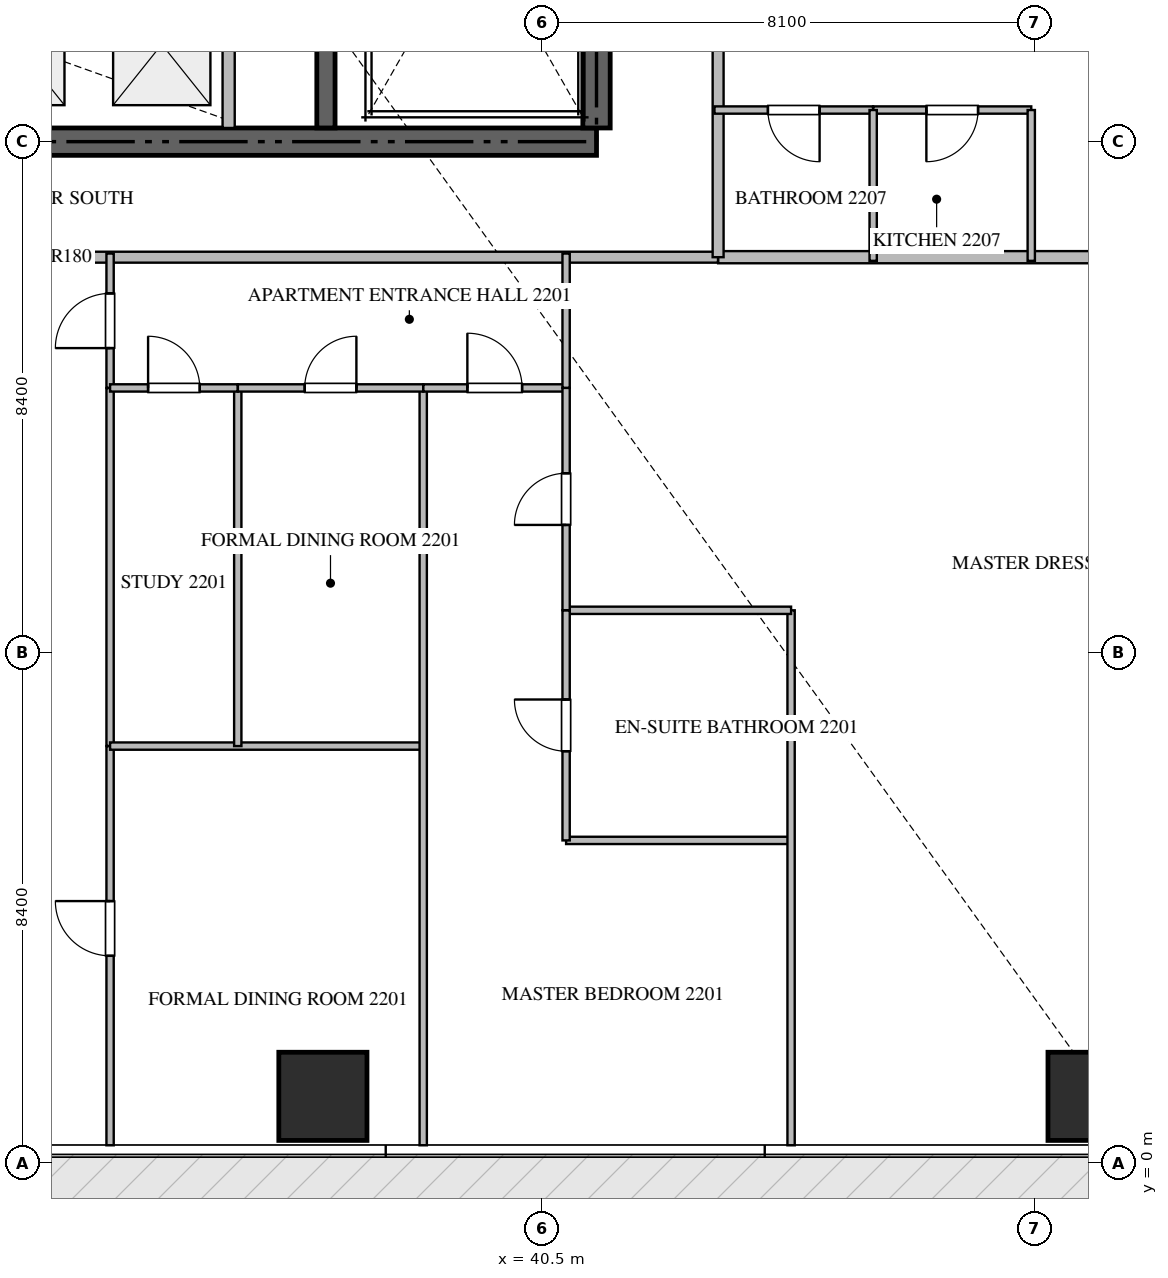
"""IFC4 building model, lengths in metres.
Left out: names, types, materials, properties, quantities, classifications, styles, units other than length and angle.
Written with IfcOpenShell. Run it as: python <this file> out.ifc"""

import sys

from ifc_helpers import new_model, si_unit, direction, frame, frame_2d, origin, origin_2d, place, context, subcontext, project, spatial, rectangle, extrude, source, transform, mapped, element, fill, save


model = new_model("IFC4")
c1 = context("Model", 3, precision=1e-05, world=origin(), true_north=direction((0.0, 1.0)))
c2 = subcontext(c1, "Body", "Model", "MODEL_VIEW")
j1 = project(units=[si_unit("LENGTHUNIT", "METRE"), si_unit("PLANEANGLEUNIT", "RADIAN")], contexts=[c1])
p1 = place(None, origin())
s1 = spatial("IfcSite", under=j1, at=p1, CompositionType="ELEMENT")
p2 = place(p1, origin())
s2 = spatial("IfcBuilding", under=s1, at=p2, CompositionType="ELEMENT")
p3 = place(p2, frame((0.0, 0.0, 90.45)))
s3 = spatial("IfcBuildingStorey", under=s2, at=p3, CompositionType="ELEMENT", Elevation=90.45)
p4 = place(p3, frame((23.4, 16.8, -0.26), z_axis=(0.0, 0.0, 1.0), x_axis=(1.0, 0.0, 0.0)))
e1 = element("IfcWall", 1, at=p4, inside=s3, PredefinedType="SHEAR", context=c2, shape_type="SweptSolid", body=[
    extrude(rectangle(XDim=18.0, YDim=0.45, at=frame_2d((9.0, 0.0))), origin(), (0.0, 0.0, 1.0), 3.748),
])
p5 = place(p3, frame((41.4, 17.025, -0.26), z_axis=(0.0, 0.0, 1.0), x_axis=(0.0, 1.0, 0.0)))
e2 = element("IfcWall", 2, at=p5, inside=s3, PredefinedType="SHEAR", context=c2, shape_type="SweptSolid", body=[
    extrude(rectangle(XDim=8.325, YDim=0.45, at=frame_2d((4.163, 0.0))), origin(), (0.0, 0.0, 1.0), 3.748),
])
p6 = place(p3, frame((36.95, 17.025, -0.26), z_axis=(0.0, 0.0, 1.0), x_axis=(0.0, 1.0, 0.0)))
e3 = element("IfcWall", 3, at=p6, inside=s3, PredefinedType="SHEAR", context=c2, shape_type="SweptSolid", body=[
    extrude(rectangle(XDim=8.325, YDim=0.3, at=frame_2d((4.163, 0.0))), origin(), (0.0, 0.0, 1.0), 3.748),
])
m1 = source(origin(), c2, "Body", "SweptSolid", [
    extrude(rectangle(XDim=1.45, YDim=1.45, at=origin_2d()), origin(), (0.0, 0.0, 1.0), 3.75),
])
for number, where, z_axis, x_axis in (
    (4, (36.9, 1.1, -0.26), (0.0, 0.0, 1.0), (1.0, 0.0, 0.0)),
    (5, (49.55, 1.1, -0.26), (0.0, 0.0, 1.0), (1.0, 0.0, 0.0)),
):
    element("IfcColumn", number, at=place(p3, frame(where, z_axis=z_axis, x_axis=x_axis)), inside=s3, PredefinedType="COLUMN", context=c2, shape_type="MappedRepresentation", body=[
        mapped(m1, transform((0.0, 0.0, 0.0), scale=1.0)),
    ])
p7 = place(p3, frame((35.35, 17.025, 0.0), z_axis=(0.0, 0.0, 1.0), x_axis=(0.0, 1.0, 0.0)))
e6 = element("IfcWall", 6, at=p7, inside=s3, PredefinedType="STANDARD", context=c2, shape_type="SweptSolid", body=[
    extrude(rectangle(XDim=2.525, YDim=0.2, at=frame_2d((1.263, 0.0))), origin(), (0.0, 0.0, 1.0), 3.49),
])
p8 = place(p3, frame((43.4, 14.9, 0.0), z_axis=(0.0, 0.0, 1.0), x_axis=(1.0, 0.0, 0.0)))
e7 = element("IfcWall", 7, at=p8, inside=s3, PredefinedType="PARTITIONING", context=c2, shape_type="SweptSolid", body=[
    extrude(rectangle(XDim=15.318, YDim=0.2, at=frame_2d((7.659, 0.0))), origin(), (0.0, 0.0, 1.0), 3.49),
])
p9 = place(p3, frame((21.402, 14.9, 0.0), z_axis=(0.0, 0.0, 1.0), x_axis=(1.0, 0.0, 0.0)))
e8 = element("IfcWall", 8, at=p9, inside=s3, PredefinedType="PARTITIONING", context=c2, shape_type="SweptSolid", body=[
    extrude(rectangle(XDim=21.996, YDim=0.18, at=frame_2d((10.998, 0.0))), origin(), (0.0, 0.0, 1.0), 3.49),
])
p10 = place(p9, frame((7.202, 0.0, 0.0)))
e9 = element("IfcOpeningElement", 9, at=p10, cuts=e8, PredefinedType="OPENING", context=c2, shape_type="SweptSolid", body=[
    extrude(rectangle(XDim=1.0, YDim=2.15, at=frame_2d((0.5, 1.075))), frame((0.0, 0.1, 0.0), z_axis=(0.0, -1.0, 0.0), x_axis=(1.0, 0.0, 0.0)), (0.0, 0.0, 1.0), 0.2),
])
p11 = place(p3, frame((43.4, 14.9, 0.0), z_axis=(0.0, 0.0, 1.0), x_axis=(0.0, 1.0, 0.0)))
e10 = element("IfcWall", 10, at=p11, inside=s3, PredefinedType="PARTITIONING", context=c2, shape_type="SweptSolid", body=[
    extrude(rectangle(XDim=20.6, YDim=0.18, at=frame_2d((10.3, 0.0))), origin(), (0.0, 0.0, 1.0), 3.49),
])
p12 = place(p11, frame((3.469, 0.0, 0.0)))
e11 = element("IfcOpeningElement", 11, at=p12, cuts=e10, PredefinedType="OPENING", context=c2, shape_type="SweptSolid", body=[
    extrude(rectangle(XDim=1.0, YDim=2.15, at=frame_2d((0.5, 1.075))), frame((0.0, 0.1, 0.0), z_axis=(0.0, -1.0, 0.0), x_axis=(1.0, 0.0, 0.0)), (0.0, 0.0, 1.0), 0.2),
])
p13 = place(p11, frame((11.074, 0.0, 0.0)))
e12 = element("IfcOpeningElement", 12, at=p13, cuts=e10, PredefinedType="OPENING", context=c2, shape_type="SweptSolid", body=[
    extrude(rectangle(XDim=1.0, YDim=2.15, at=frame_2d((0.5, 1.075))), frame((0.0, 0.1, 0.0), z_axis=(0.0, -1.0, 0.0), x_axis=(1.0, 0.0, 0.0)), (0.0, 0.0, 1.0), 0.2),
])
p14 = place(p11, frame((17.78, 0.0, 0.0)))
e13 = element("IfcOpeningElement", 13, at=p14, cuts=e10, PredefinedType="OPENING", context=c2, shape_type="SweptSolid", body=[
    extrude(rectangle(XDim=1.0, YDim=2.15, at=frame_2d((0.5, 1.075))), frame((0.0, 0.1, 0.0), z_axis=(0.0, -1.0, 0.0), x_axis=(1.0, 0.0, 0.0)), (0.0, 0.0, 1.0), 0.2),
])
p15 = place(p3, frame((33.4, 12.75, 0.0), z_axis=(0.0, 0.0, 1.0), x_axis=(0.0, 1.0, 0.0)))
e14 = element("IfcWall", 14, at=p15, inside=s3, PredefinedType="PARTITIONING", context=c2, shape_type="SweptSolid", body=[
    extrude(rectangle(XDim=2.21, YDim=0.12, at=frame_2d((1.105, 0.0))), origin(), (0.0, 0.0, 1.0), 3.49),
])
p16 = place(p15, frame((0.655, 0.0, 0.0)))
e15 = element("IfcOpeningElement", 15, at=p16, cuts=e14, PredefinedType="OPENING", context=c2, shape_type="SweptSolid", body=[
    extrude(rectangle(XDim=0.9, YDim=2.1, at=frame_2d((0.45, 1.05))), frame((0.0, 0.07, 0.0), z_axis=(0.0, -1.0, 0.0), x_axis=(1.0, 0.0, 0.0)), (0.0, 0.0, 1.0), 0.14),
])
p17 = place(p3, frame((33.4, 0.295, 0.0), z_axis=(0.0, 0.0, 1.0), x_axis=(0.0, 1.0, 0.0)))
e16 = element("IfcWall", 16, at=p17, inside=s3, PredefinedType="PARTITIONING", context=c2, shape_type="SweptSolid", body=[
    extrude(rectangle(XDim=6.565, YDim=0.12, at=frame_2d((3.283, 0.0))), origin(), (0.0, 0.0, 1.0), 3.49),
])
p18 = place(p17, frame((3.116, 0.0, 0.0)))
e17 = element("IfcOpeningElement", 17, at=p18, cuts=e16, PredefinedType="OPENING", context=c2, shape_type="SweptSolid", body=[
    extrude(rectangle(XDim=0.9, YDim=2.1, at=frame_2d((0.45, 1.05))), frame((0.0, 0.07, 0.0), z_axis=(0.0, -1.0, 0.0), x_axis=(1.0, 0.0, 0.0)), (0.0, 0.0, 1.0), 0.14),
])
p19 = place(p3, frame((33.4, 6.862, 0.0), z_axis=(0.0, 0.0, 1.0), x_axis=(0.0, 1.0, 0.0)))
e18 = element("IfcWall", 18, at=p19, inside=s3, PredefinedType="PARTITIONING", context=c2, shape_type="SweptSolid", body=[
    extrude(rectangle(XDim=5.886, YDim=0.12, at=frame_2d((2.943, 0.0))), origin(), (0.0, 0.0, 1.0), 3.49),
])
p20 = place(p3, frame((33.4, 6.86, 0.0), z_axis=(0.0, 0.0, 1.0), x_axis=(1.0, 0.0, 0.0)))
e19 = element("IfcWall", 19, at=p20, inside=s3, PredefinedType="PARTITIONING", context=c2, shape_type="SweptSolid", body=[
    extrude(rectangle(XDim=5.15, YDim=0.12, at=frame_2d((2.575, 0.0))), origin(), (0.0, 0.0, 1.0), 3.49),
])
p21 = place(p3, frame((38.55, 0.295, 0.0), z_axis=(0.0, 0.0, 1.0), x_axis=(0.0, 1.0, 0.0)))
e20 = element("IfcWall", 20, at=p21, inside=s3, PredefinedType="PARTITIONING", context=c2, shape_type="SweptSolid", body=[
    extrude(rectangle(XDim=12.455, YDim=0.12, at=frame_2d((6.228, 0.0))), origin(), (0.0, 0.0, 1.0), 3.49),
])
p22 = place(p3, frame((35.5, 6.86, 0.0), z_axis=(0.0, 0.0, 1.0), x_axis=(0.0, 1.0, 0.0)))
e21 = element("IfcWall", 21, at=p22, inside=s3, PredefinedType="PARTITIONING", context=c2, shape_type="SweptSolid", body=[
    extrude(rectangle(XDim=5.89, YDim=0.12, at=frame_2d((2.945, 0.0))), origin(), (0.0, 0.0, 1.0), 3.49),
])
p23 = place(p3, frame((33.4, 12.75, 0.0), z_axis=(0.0, 0.0, 1.0), x_axis=(1.0, 0.0, 0.0)))
e22 = element("IfcWall", 22, at=p23, inside=s3, PredefinedType="PARTITIONING", context=c2, shape_type="SweptSolid", body=[
    extrude(rectangle(XDim=2.1, YDim=0.12, at=frame_2d((1.05, 0.0))), origin(), (0.0, 0.0, 1.0), 3.49),
])
p24 = place(p23, frame((0.625, 0.0, 0.0)))
e23 = element("IfcOpeningElement", 23, at=p24, cuts=e22, PredefinedType="OPENING", context=c2, shape_type="SweptSolid", body=[
    extrude(rectangle(XDim=0.85, YDim=2.1, at=frame_2d((0.425, 1.05))), frame((0.0, 0.07, 0.0), z_axis=(0.0, -1.0, 0.0), x_axis=(1.0, 0.0, 0.0)), (0.0, 0.0, 1.0), 0.14),
])
p25 = place(p3, frame((35.502, 12.75, 0.0), z_axis=(0.0, 0.0, 1.0), x_axis=(1.0, 0.0, 0.0)))
e24 = element("IfcWall", 24, at=p25, inside=s3, PredefinedType="PARTITIONING", context=c2, shape_type="SweptSolid", body=[
    extrude(rectangle(XDim=3.048, YDim=0.12, at=frame_2d((1.524, 0.0))), origin(), (0.0, 0.0, 1.0), 3.49),
])
p26 = place(p25, frame((1.099, 0.0, 0.0)))
e25 = element("IfcOpeningElement", 25, at=p26, cuts=e24, PredefinedType="OPENING", context=c2, shape_type="SweptSolid", body=[
    extrude(rectangle(XDim=0.85, YDim=2.1, at=frame_2d((0.425, 1.05))), frame((0.0, 0.07, 0.0), z_axis=(0.0, -1.0, 0.0), x_axis=(1.0, 0.0, 0.0)), (0.0, 0.0, 1.0), 0.14),
])
p27 = place(p3, frame((38.552, 12.75, 0.0), z_axis=(0.0, 0.0, 1.0), x_axis=(1.0, 0.0, 0.0)))
e26 = element("IfcWall", 26, at=p27, inside=s3, PredefinedType="PARTITIONING", context=c2, shape_type="SweptSolid", body=[
    extrude(rectangle(XDim=2.348, YDim=0.12, at=frame_2d((1.174, 0.0))), origin(), (0.0, 0.0, 1.0), 3.49),
])
p28 = place(p27, frame((0.724, 0.0, 0.0)))
e27 = element("IfcOpeningElement", 27, at=p28, cuts=e26, PredefinedType="OPENING", context=c2, shape_type="SweptSolid", body=[
    extrude(rectangle(XDim=0.9, YDim=2.1, at=frame_2d((0.45, 1.05))), frame((0.0, 0.07, 0.0), z_axis=(0.0, -1.0, 0.0), x_axis=(1.0, 0.0, 0.0)), (0.0, 0.0, 1.0), 0.14),
])
p29 = place(p3, frame((40.9, 5.309, 0.0), z_axis=(0.0, 0.0, 1.0), x_axis=(1.0, 0.0, 0.0)))
e28 = element("IfcWall", 28, at=p29, inside=s3, PredefinedType="PARTITIONING", context=c2, shape_type="SweptSolid", body=[
    extrude(rectangle(XDim=3.7, YDim=0.12, at=frame_2d((1.85, 0.0))), origin(), (0.0, 0.0, 1.0), 3.49),
])
p30 = place(p3, frame((44.6, 0.295, 0.0), z_axis=(0.0, 0.0, 1.0), x_axis=(0.0, 1.0, 0.0)))
e29 = element("IfcWall", 29, at=p30, inside=s3, PredefinedType="PARTITIONING", context=c2, shape_type="SweptSolid", body=[
    extrude(rectangle(XDim=8.798, YDim=0.12, at=frame_2d((4.399, 0.0))), origin(), (0.0, 0.0, 1.0), 3.49),
])
p31 = place(p3, frame((40.9, 9.093, 0.0), z_axis=(0.0, 0.0, 1.0), x_axis=(1.0, 0.0, 0.0)))
e30 = element("IfcWall", 30, at=p31, inside=s3, PredefinedType="PARTITIONING", context=c2, shape_type="SweptSolid", body=[
    extrude(rectangle(XDim=3.7, YDim=0.12, at=frame_2d((1.85, 0.0))), origin(), (0.0, 0.0, 1.0), 3.49),
])
p32 = place(p3, frame((40.9, 5.309, 0.0), z_axis=(0.0, 0.0, 1.0), x_axis=(0.0, 1.0, 0.0)))
e31 = element("IfcWall", 31, at=p32, inside=s3, PredefinedType="PARTITIONING", context=c2, shape_type="SweptSolid", body=[
    extrude(rectangle(XDim=3.784, YDim=0.12, at=frame_2d((1.892, 0.0))), origin(), (0.0, 0.0, 1.0), 3.49),
])
p33 = place(p32, frame((1.467, 0.0, 0.0)))
e32 = element("IfcOpeningElement", 32, at=p33, cuts=e31, PredefinedType="OPENING", context=c2, shape_type="SweptSolid", body=[
    extrude(rectangle(XDim=0.85, YDim=2.1, at=frame_2d((0.425, 1.05))), frame((0.0, 0.07, 0.0), z_axis=(0.0, -1.0, 0.0), x_axis=(1.0, 0.0, 0.0)), (0.0, 0.0, 1.0), 0.14),
])
p34 = place(p3, frame((40.9, 9.095, 0.0), z_axis=(0.0, 0.0, 1.0), x_axis=(0.0, 1.0, 0.0)))
e33 = element("IfcWall", 33, at=p34, inside=s3, PredefinedType="PARTITIONING", context=c2, shape_type="SweptSolid", body=[
    extrude(rectangle(XDim=3.655, YDim=0.12, at=frame_2d((1.828, 0.0))), origin(), (0.0, 0.0, 1.0), 3.49),
])
p35 = place(p34, frame((1.402, 0.0, 0.0)))
e34 = element("IfcOpeningElement", 34, at=p35, cuts=e33, PredefinedType="OPENING", context=c2, shape_type="SweptSolid", body=[
    extrude(rectangle(XDim=0.85, YDim=2.1, at=frame_2d((0.425, 1.05))), frame((0.0, 0.07, 0.0), z_axis=(0.0, -1.0, 0.0), x_axis=(1.0, 0.0, 0.0)), (0.0, 0.0, 1.0), 0.14),
])
p36 = place(p3, frame((40.9, 12.752, 0.0), z_axis=(0.0, 0.0, 1.0), x_axis=(0.0, 1.0, 0.0)))
e35 = element("IfcWall", 35, at=p36, inside=s3, PredefinedType="PARTITIONING", context=c2, shape_type="SweptSolid", body=[
    extrude(rectangle(XDim=2.208, YDim=0.12, at=frame_2d((1.104, 0.0))), origin(), (0.0, 0.0, 1.0), 3.49),
])
p37 = place(p3, frame((48.55, 17.32, 0.0), z_axis=(0.0, 0.0, 1.0), x_axis=(-1.0, 0.0, 0.0)))
e36 = element("IfcWall", 36, at=p37, inside=s3, PredefinedType="PARTITIONING", context=c2, shape_type="SweptSolid", body=[
    extrude(rectangle(XDim=2.6, YDim=0.12, at=frame_2d((1.3, 0.0))), origin(), (0.0, 0.0, 1.0), 3.49),
])
p38 = place(p37, frame((0.875, 0.0, 0.0)))
e37 = element("IfcOpeningElement", 37, at=p38, cuts=e36, PredefinedType="OPENING", context=c2, shape_type="SweptSolid", body=[
    extrude(rectangle(XDim=0.85, YDim=2.1, at=frame_2d((0.425, 1.05))), frame((0.0, 0.07, 0.0), z_axis=(0.0, -1.0, 0.0), x_axis=(1.0, 0.0, 0.0)), (0.0, 0.0, 1.0), 0.14),
])
p39 = place(p3, frame((45.948, 17.32, 0.0), z_axis=(0.0, 0.0, 1.0), x_axis=(-1.0, 0.0, 0.0)))
e38 = element("IfcWall", 38, at=p39, inside=s3, PredefinedType="PARTITIONING", context=c2, shape_type="SweptSolid", body=[
    extrude(rectangle(XDim=2.608, YDim=0.12, at=frame_2d((1.304, 0.0))), origin(), (0.0, 0.0, 1.0), 3.49),
])
p40 = place(p39, frame((0.879, 0.0, 0.0)))
e39 = element("IfcOpeningElement", 39, at=p40, cuts=e38, PredefinedType="OPENING", context=c2, shape_type="SweptSolid", body=[
    extrude(rectangle(XDim=0.85, YDim=2.1, at=frame_2d((0.425, 1.05))), frame((0.0, 0.07, 0.0), z_axis=(0.0, -1.0, 0.0), x_axis=(1.0, 0.0, 0.0)), (0.0, 0.0, 1.0), 0.14),
])
for number, where, z_axis, x_axis in (
    (40, (45.95, 14.84, 0.0), (0.0, 0.0, 1.0), (0.0, 1.0, 0.0)),
    (41, (48.55, 14.84, 0.0), (0.0, 0.0, 1.0), (0.0, 1.0, 0.0)),
):
    element("IfcWall", number, at=place(p3, frame(where, z_axis=z_axis, x_axis=x_axis)), inside=s3, PredefinedType="PARTITIONING", context=c2, shape_type="SweptSolid", body=[
        extrude(rectangle(XDim=2.48, YDim=0.12, at=frame_2d((1.24, 0.0))), origin(), (0.0, 0.0, 1.0), 3.49),
    ])
m2 = source(origin(), c2, "Body", "SweptSolid", [
    extrude(rectangle(XDim=0.9, YDim=2.1, at=frame_2d((0.45, 1.05))), frame((0.0, 0.025, 0.0), z_axis=(0.0, -1.0, 0.0), x_axis=(1.0, 0.0, 0.0)), (0.0, 0.0, 1.0), 0.05),
])
p41 = place(p16, origin())
e42 = element("IfcDoor", 42, at=p41, inside=s3, OperationType="SINGLE_SWING_LEFT", PredefinedType="DOOR", context=c2, shape_type="MappedRepresentation", body=[
    mapped(m2, transform((0.0, 0.0, 0.0), scale=1.0)),
])
fill(e15, e42)
p42 = place(p18, origin())
e43 = element("IfcDoor", 43, at=p42, inside=s3, OperationType="SINGLE_SWING_RIGHT", PredefinedType="DOOR", context=c2, shape_type="MappedRepresentation", body=[
    mapped(m2, transform((0.0, 0.0, 0.0), scale=1.0)),
])
fill(e17, e43)
m3 = source(origin(), c2, "Body", "SweptSolid", [
    extrude(rectangle(XDim=0.85, YDim=2.1, at=frame_2d((0.425, 1.05))), frame((0.0, 0.025, 0.0), z_axis=(0.0, -1.0, 0.0), x_axis=(1.0, 0.0, 0.0)), (0.0, 0.0, 1.0), 0.05),
])
p43 = place(p24, origin())
e44 = element("IfcDoor", 44, at=p43, inside=s3, OperationType="SINGLE_SWING_LEFT", PredefinedType="DOOR", context=c2, shape_type="MappedRepresentation", body=[
    mapped(m3, transform((0.0, 0.0, 0.0), scale=1.0)),
])
fill(e23, e44)
p44 = place(p26, origin())
e45 = element("IfcDoor", 45, at=p44, inside=s3, OperationType="SINGLE_SWING_RIGHT", PredefinedType="DOOR", context=c2, shape_type="MappedRepresentation", body=[
    mapped(m3, transform((0.0, 0.0, 0.0), scale=1.0)),
])
fill(e25, e45)
p45 = place(p28, origin())
e46 = element("IfcDoor", 46, at=p45, inside=s3, OperationType="SINGLE_SWING_LEFT", PredefinedType="DOOR", context=c2, shape_type="MappedRepresentation", body=[
    mapped(m2, transform((0.0, 0.0, 0.0), scale=1.0)),
])
fill(e27, e46)
p46 = place(p33, origin())
e47 = element("IfcDoor", 47, at=p46, inside=s3, OperationType="SINGLE_SWING_RIGHT", PredefinedType="DOOR", context=c2, shape_type="MappedRepresentation", body=[
    mapped(m3, transform((0.0, 0.0, 0.0), scale=1.0)),
])
fill(e32, e47)
p47 = place(p35, origin())
e48 = element("IfcDoor", 48, at=p47, inside=s3, OperationType="SINGLE_SWING_LEFT", PredefinedType="DOOR", context=c2, shape_type="MappedRepresentation", body=[
    mapped(m3, transform((0.0, 0.0, 0.0), scale=1.0)),
])
fill(e34, e48)
p48 = place(p38, origin())
e49 = element("IfcDoor", 49, at=p48, inside=s3, OperationType="SINGLE_SWING_RIGHT", PredefinedType="DOOR", context=c2, shape_type="MappedRepresentation", body=[
    mapped(m3, transform((0.0, 0.0, 0.0), scale=1.0)),
])
fill(e37, e49)
p49 = place(p40, origin())
e50 = element("IfcDoor", 50, at=p49, inside=s3, OperationType="SINGLE_SWING_LEFT", PredefinedType="DOOR", context=c2, shape_type="MappedRepresentation", body=[
    mapped(m3, transform((0.0, 0.0, 0.0), scale=1.0)),
])
fill(e39, e50)
save(model, sys.argv[1])
